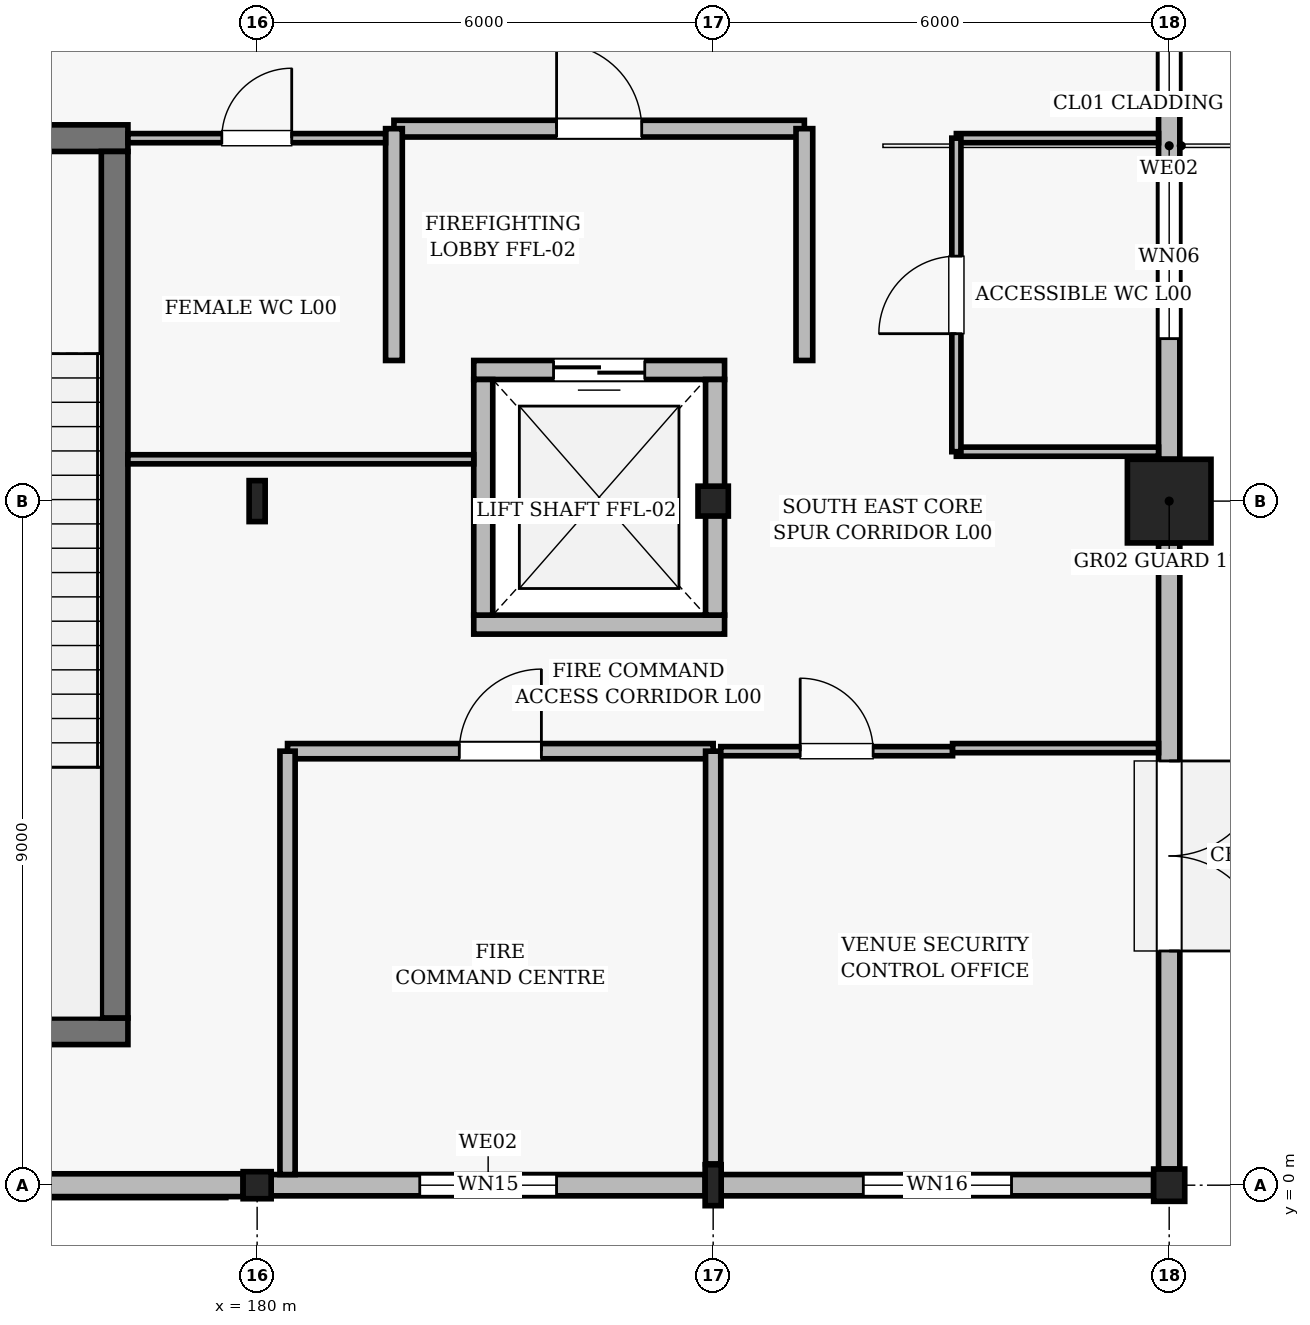
"""IFC4 building model, lengths in metres.
Left out: names, types, materials, properties, quantities, classifications, styles, units other than length and angle.
Written with IfcOpenShell. Run it as: python <this file> out.ifc"""

import sys

from ifc_helpers import new_model, si_unit, direction, frame, frame_2d, origin, origin_2d, place, context, subcontext, project, spatial, rectangle, i_section, extrude, element, fill, save


model = new_model("IFC4")
c1 = context("Model", 3, precision=1e-05, world=origin(), true_north=direction((0.0, 1.0)))
c2 = subcontext(c1, "Body", "Model", "MODEL_VIEW")
j1 = project(units=[si_unit("LENGTHUNIT", "METRE"), si_unit("PLANEANGLEUNIT", "RADIAN")], contexts=[c1])
p1 = place(None, origin())
s1 = spatial("IfcSite", under=j1, at=p1, CompositionType="ELEMENT")
p2 = place(p1, origin())
s2 = spatial("IfcBuilding", under=s1, at=p2, CompositionType="ELEMENT")
p3 = place(p2, origin())
s3 = spatial("IfcBuildingStorey", under=s2, at=p3, CompositionType="ELEMENT", Elevation=0.0)
p4 = place(p3, frame((180.0, 0.0, 0.0), z_axis=(0.0, 0.0, 1.0), x_axis=(1.0, 0.0, 0.0)))
e1 = element("IfcColumn", 1, at=p4, inside=s3, PredefinedType="COLUMN", context=c2, shape_type="SweptSolid", body=[
    extrude(i_section(OverallWidth=0.369, OverallDepth=0.356, WebThickness=0.011, FlangeThickness=0.018, FilletRadius=0.015, at=origin_2d()), origin(), (0.0, 0.0, 1.0), 5.4),
])
for number, where, z_axis, x_axis in (
    (2, (180.0, 9.0, 0.0), (0.0, 0.0, 1.0), (1.0, 0.0, 0.0)),
    (3, (186.0, 0.0, 0.0), (0.0, 0.0, 1.0), (1.0, 0.0, 0.0)),
):
    element("IfcColumn", number, at=place(p3, frame(where, z_axis=z_axis, x_axis=x_axis)), inside=s3, PredefinedType="COLUMN", context=c2, shape_type="SweptSolid", body=[
        extrude(i_section(OverallWidth=0.211, OverallDepth=0.539, WebThickness=0.012, FlangeThickness=0.019, FilletRadius=0.014, at=origin_2d()), origin(), (0.0, 0.0, 1.0), 5.4),
    ])
p5 = place(p3, frame((186.0, 9.0, 0.0), z_axis=(0.0, 0.0, 1.0), x_axis=(1.0, 0.0, 0.0)))
e4 = element("IfcColumn", 4, at=p5, inside=s3, PredefinedType="COLUMN", context=c2, shape_type="SweptSolid", body=[
    extrude(i_section(OverallWidth=0.399, OverallDepth=0.393, WebThickness=0.023, FlangeThickness=0.037, FilletRadius=0.018, at=origin_2d()), origin(), (0.0, 0.0, 1.0), 5.4),
])
p6 = place(p3, frame((192.0, 0.0, 0.0), z_axis=(0.0, 0.0, 1.0), x_axis=(1.0, 0.0, 0.0)))
e5 = element("IfcColumn", 5, at=p6, inside=s3, PredefinedType="COLUMN", context=c2, shape_type="SweptSolid", body=[
    extrude(i_section(OverallWidth=0.409, OverallDepth=0.425, WebThickness=0.031, FlangeThickness=0.049, FilletRadius=0.02, at=origin_2d()), origin(), (0.0, 0.0, 1.0), 5.4),
])
p7 = place(p3, frame((192.0, 9.0, 0.0), z_axis=(0.0, 0.0, 1.0), x_axis=(1.0, 0.0, 0.0)))
e6 = element("IfcColumn", 6, at=p7, inside=s3, PredefinedType="COLUMN", context=c2, shape_type="SweptSolid", body=[
    extrude(rectangle(XDim=1.1, YDim=1.1, at=origin_2d()), origin(), (0.0, 0.0, 1.0), 5.4),
])
p8 = place(p3, frame((192.0, 8.45, 0.0), z_axis=(0.0, 0.0, 1.0), x_axis=(0.0, -1.0, 0.0)))
e7 = element("IfcWall", 7, at=p8, inside=s3, PredefinedType="SOLIDWALL", context=c2, shape_type="SweptSolid", body=[
    extrude(rectangle(XDim=8.238, YDim=0.28, at=frame_2d((4.119, 0.0))), origin(), (0.0, 0.0, 1.0), 4.699),
])
p9 = place(p8, frame((2.869, 0.0, 0.0)))
e8 = element("IfcOpeningElement", 8, at=p9, cuts=e7, PredefinedType="OPENING", context=c2, shape_type="SweptSolid", body=[
    extrude(rectangle(XDim=2.5, YDim=2.45, at=frame_2d((1.25, 1.225))), frame((0.0, 0.15, 0.0), z_axis=(0.0, -1.0, 0.0), x_axis=(1.0, 0.0, 0.0)), (0.0, 0.0, 1.0), 0.3),
])
p10 = place(p3, frame((192.0, 17.8, 0.0), z_axis=(0.0, 0.0, 1.0), x_axis=(0.0, -1.0, 0.0)))
e9 = element("IfcWall", 9, at=p10, inside=s3, PredefinedType="SOLIDWALL", context=c2, shape_type="SweptSolid", body=[
    extrude(rectangle(XDim=8.25, YDim=0.28, at=frame_2d((4.125, 0.0))), origin(), (0.0, 0.0, 1.0), 4.865),
])
p11 = place(p10, frame((1.663, 0.0, 0.95)))
e10 = element("IfcOpeningElement", 10, at=p11, cuts=e9, PredefinedType="OPENING", context=c2, shape_type="SweptSolid", body=[
    extrude(rectangle(XDim=2.0, YDim=1.85, at=frame_2d((1.0, 0.925))), frame((0.0, 0.15, 0.0), z_axis=(0.0, -1.0, 0.0), x_axis=(1.0, 0.0, 0.0)), (0.0, 0.0, 1.0), 0.3),
])
p12 = place(p10, frame((4.512, 0.0, 0.95)))
e11 = element("IfcOpeningElement", 11, at=p12, cuts=e9, PredefinedType="OPENING", context=c2, shape_type="SweptSolid", body=[
    extrude(rectangle(XDim=2.15, YDim=1.85, at=frame_2d((1.075, 0.925))), frame((0.0, 0.15, 0.0), z_axis=(0.0, -1.0, 0.0), x_axis=(1.0, 0.0, 0.0)), (0.0, 0.0, 1.0), 0.3),
])
p13 = place(p3, frame((179.815, 0.0, 0.0), z_axis=(0.0, 0.0, 1.0), x_axis=(-1.0, 0.0, 0.0)))
e12 = element("IfcWall", 12, at=p13, inside=s3, PredefinedType="SOLIDWALL", context=c2, shape_type="SweptSolid", body=[
    extrude(rectangle(XDim=8.628, YDim=0.3, at=frame_2d((4.314, 0.0))), origin(), (0.0, 0.0, 1.0), 4.626),
])
p14 = place(p3, frame((185.895, 0.0, 0.0), z_axis=(0.0, 0.0, 1.0), x_axis=(-1.0, 0.0, 0.0)))
e13 = element("IfcWall", 13, at=p14, inside=s3, PredefinedType="SOLIDWALL", context=c2, shape_type="SweptSolid", body=[
    extrude(rectangle(XDim=5.71, YDim=0.28, at=frame_2d((2.855, 0.0))), origin(), (0.0, 0.0, 1.0), 4.699),
])
p15 = place(p14, frame((1.955, 0.0, 0.95)))
e14 = element("IfcOpeningElement", 14, at=p15, cuts=e13, PredefinedType="OPENING", context=c2, shape_type="SweptSolid", body=[
    extrude(rectangle(XDim=1.8, YDim=2.1, at=frame_2d((0.9, 1.05))), frame((0.0, 0.15, 0.0), z_axis=(0.0, -1.0, 0.0), x_axis=(1.0, 0.0, 0.0)), (0.0, 0.0, 1.0), 0.3),
])
p16 = place(p3, frame((191.795, 0.0, 0.0), z_axis=(0.0, 0.0, 1.0), x_axis=(-1.0, 0.0, 0.0)))
e15 = element("IfcWall", 15, at=p16, inside=s3, PredefinedType="SOLIDWALL", context=c2, shape_type="SweptSolid", body=[
    extrude(rectangle(XDim=5.69, YDim=0.28, at=frame_2d((2.845, 0.0))), origin(), (0.0, 0.0, 1.0), 4.865),
])
p17 = place(p16, frame((1.87, 0.0, 0.95)))
e16 = element("IfcOpeningElement", 16, at=p17, cuts=e15, PredefinedType="OPENING", context=c2, shape_type="SweptSolid", body=[
    extrude(rectangle(XDim=1.95, YDim=2.1, at=frame_2d((0.975, 1.05))), frame((0.0, 0.15, 0.0), z_axis=(0.0, -1.0, 0.0), x_axis=(1.0, 0.0, 0.0)), (0.0, 0.0, 1.0), 0.3),
])
p18 = place(p3, frame((172.1, 2.025, 0.0), z_axis=(0.0, 0.0, 1.0), x_axis=(1.0, 0.0, 0.0)))
e17 = element("IfcWall", 17, at=p18, inside=s3, PredefinedType="SHEAR", context=c2, shape_type="SweptSolid", body=[
    extrude(rectangle(XDim=6.2, YDim=0.35, at=frame_2d((3.1, 0.0))), origin(), (0.0, 0.0, 1.0), 5.18),
])
p19 = place(p3, frame((178.3, 13.775, 0.0), z_axis=(0.0, 0.0, 1.0), x_axis=(-1.0, 0.0, 0.0)))
e18 = element("IfcWall", 18, at=p19, inside=s3, PredefinedType="SHEAR", context=c2, shape_type="SweptSolid", body=[
    extrude(rectangle(XDim=6.2, YDim=0.35, at=frame_2d((3.1, 0.0))), origin(), (0.0, 0.0, 1.0), 5.18),
])
p20 = place(p19, frame((2.2, 0.0, 0.0)))
e19 = element("IfcOpeningElement", 19, at=p20, cuts=e18, PredefinedType="OPENING", context=c2, shape_type="SweptSolid", body=[
    extrude(rectangle(XDim=1.8, YDim=2.2, at=frame_2d((0.9, 1.1))), frame((0.0, 0.185, 0.0), z_axis=(0.0, -1.0, 0.0), x_axis=(1.0, 0.0, 0.0)), (0.0, 0.0, 1.0), 0.37),
])
p21 = place(p3, frame((178.125, 2.2, 0.0), z_axis=(0.0, 0.0, 1.0), x_axis=(0.0, 1.0, 0.0)))
e20 = element("IfcWall", 20, at=p21, inside=s3, PredefinedType="SHEAR", context=c2, shape_type="SweptSolid", body=[
    extrude(rectangle(XDim=11.4, YDim=0.35, at=frame_2d((5.7, 0.0))), origin(), (0.0, 0.0, 1.0), 5.18),
])
p22 = place(p3, frame((182.85, 7.375, 0.0), z_axis=(0.0, 0.0, 1.0), x_axis=(1.0, 0.0, 0.0)))
e21 = element("IfcWall", 21, at=p22, inside=s3, PredefinedType="SOLIDWALL", context=c2, shape_type="SweptSolid", body=[
    extrude(rectangle(XDim=3.3, YDim=0.25, at=frame_2d((1.65, 0.0))), origin(), (0.0, 0.0, 1.0), 5.18),
])
p23 = place(p3, frame((186.15, 10.725, 0.0), z_axis=(0.0, 0.0, 1.0), x_axis=(-1.0, 0.0, 0.0)))
e22 = element("IfcWall", 22, at=p23, inside=s3, PredefinedType="SOLIDWALL", context=c2, shape_type="SweptSolid", body=[
    extrude(rectangle(XDim=3.3, YDim=0.25, at=frame_2d((1.65, 0.0))), origin(), (0.0, 0.0, 1.0), 5.18),
])
p24 = place(p23, frame((1.05, 0.0, 0.0)))
e23 = element("IfcOpeningElement", 23, at=p24, cuts=e22, PredefinedType="OPENING", context=c2, shape_type="SweptSolid", body=[
    extrude(rectangle(XDim=1.2, YDim=2.25, at=frame_2d((0.6, 1.125))), frame((0.0, 0.135, 0.0), z_axis=(0.0, -1.0, 0.0), x_axis=(1.0, 0.0, 0.0)), (0.0, 0.0, 1.0), 0.27),
])
for number, where, z_axis, x_axis in (
    (24, (182.975, 10.6, 0.0), (0.0, 0.0, 1.0), (0.0, -1.0, 0.0)),
    (25, (186.025, 7.5, 0.0), (0.0, 0.0, 1.0), (0.0, 1.0, 0.0)),
):
    element("IfcWall", number, at=place(p3, frame(where, z_axis=z_axis, x_axis=x_axis)), inside=s3, PredefinedType="SOLIDWALL", context=c2, shape_type="SweptSolid", body=[
        extrude(rectangle(XDim=3.1, YDim=0.25, at=frame_2d((1.55, 0.0))), origin(), (0.0, 0.0, 1.0), 5.18),
    ])
p25 = place(p3, frame((181.8, 13.9, 0.0), z_axis=(0.0, 0.0, 1.0), x_axis=(1.0, 0.0, 0.0)))
e26 = element("IfcWall", 26, at=p25, inside=s3, PredefinedType="SOLIDWALL", context=c2, shape_type="SweptSolid", body=[
    extrude(rectangle(XDim=5.4, YDim=0.22, at=frame_2d((2.7, 0.0))), origin(), (0.0, 0.0, 1.0), 5.18),
])
p26 = place(p25, frame((2.14, 0.0, 0.0)))
e27 = element("IfcOpeningElement", 27, at=p26, cuts=e26, PredefinedType="OPENING", context=c2, shape_type="SweptSolid", body=[
    extrude(rectangle(XDim=1.12, YDim=2.2, at=frame_2d((0.56, 1.1))), frame((0.0, 0.12, 0.0), z_axis=(0.0, -1.0, 0.0), x_axis=(1.0, 0.0, 0.0)), (0.0, 0.0, 1.0), 0.24),
])
for number, where, z_axis, x_axis in (
    (28, (181.8, 10.85, 0.0), (0.0, 0.0, 1.0), (0.0, 1.0, 0.0)),
    (29, (187.2, 10.85, 0.0), (0.0, 0.0, 1.0), (0.0, 1.0, 0.0)),
):
    element("IfcWall", number, at=place(p3, frame(where, z_axis=z_axis, x_axis=x_axis)), inside=s3, PredefinedType="SOLIDWALL", context=c2, shape_type="SweptSolid", body=[
        extrude(rectangle(XDim=3.05, YDim=0.22, at=frame_2d((1.525, 0.0))), origin(), (0.0, 0.0, 1.0), 5.18),
    ])
p27 = place(p3, frame((178.3, 13.775, 0.0), z_axis=(0.0, 0.0, 1.0), x_axis=(1.0, 0.0, 0.0)))
e30 = element("IfcWall", 30, at=p27, inside=s3, PredefinedType="PARTITIONING", context=c2, shape_type="SweptSolid", body=[
    extrude(rectangle(XDim=3.39, YDim=0.12, at=frame_2d((1.695, 0.0))), origin(), (0.0, 0.0, 1.0), 4.392),
])
p28 = place(p27, frame((1.235, 0.0, 0.0)))
e31 = element("IfcOpeningElement", 31, at=p28, cuts=e30, PredefinedType="OPENING", context=c2, shape_type="SweptSolid", body=[
    extrude(rectangle(XDim=0.92, YDim=2.12, at=frame_2d((0.46, 1.06))), frame((0.0, 0.07, 0.0), z_axis=(0.0, -1.0, 0.0), x_axis=(1.0, 0.0, 0.0)), (0.0, 0.0, 1.0), 0.14),
])
p29 = place(p3, frame((182.85, 9.55, 0.0), z_axis=(0.0, 0.0, 1.0), x_axis=(-1.0, 0.0, 0.0)))
e32 = element("IfcWall", 32, at=p29, inside=s3, PredefinedType="PARTITIONING", context=c2, shape_type="SweptSolid", body=[
    extrude(rectangle(XDim=4.55, YDim=0.12, at=frame_2d((2.275, 0.0))), origin(), (0.0, 0.0, 1.0), 4.392),
])
for number, where, z_axis, x_axis in (
    (33, (189.2, 13.775, 0.0), (0.0, 0.0, 1.0), (1.0, 0.0, 0.0)),
    (34, (191.86, 9.65, 0.0), (0.0, 0.0, 1.0), (-1.0, 0.0, 0.0)),
):
    element("IfcWall", number, at=place(p3, frame(where, z_axis=z_axis, x_axis=x_axis)), inside=s3, PredefinedType="PARTITIONING", context=c2, shape_type="SweptSolid", body=[
        extrude(rectangle(XDim=2.66, YDim=0.12, at=frame_2d((1.33, 0.0))), origin(), (0.0, 0.0, 1.0), 4.865),
    ])
p30 = place(p3, frame((189.2, 9.65, 0.0), z_axis=(0.0, 0.0, 1.0), x_axis=(0.0, 1.0, 0.0)))
e35 = element("IfcWall", 35, at=p30, inside=s3, PredefinedType="PARTITIONING", context=c2, shape_type="SweptSolid", body=[
    extrude(rectangle(XDim=4.125, YDim=0.12, at=frame_2d((2.062, 0.0))), origin(), (0.0, 0.0, 1.0), 5.18),
])
p31 = place(p30, frame((1.552, 0.0, 0.0)))
e36 = element("IfcOpeningElement", 36, at=p31, cuts=e35, PredefinedType="OPENING", context=c2, shape_type="SweptSolid", body=[
    extrude(rectangle(XDim=1.02, YDim=2.16, at=frame_2d((0.51, 1.08))), frame((0.0, 0.07, 0.0), z_axis=(0.0, -1.0, 0.0), x_axis=(1.0, 0.0, 0.0)), (0.0, 0.0, 1.0), 0.14),
])
p32 = place(p3, frame((180.4, 5.71, 0.0), z_axis=(0.0, 0.0, 1.0), x_axis=(1.0, 0.0, 0.0)))
e37 = element("IfcWall", 37, at=p32, inside=s3, PredefinedType="PARTITIONING", context=c2, shape_type="SweptSolid", body=[
    extrude(rectangle(XDim=5.6, YDim=0.2, at=frame_2d((2.8, 0.0))), origin(), (0.0, 0.0, 1.0), 4.481),
])
p33 = place(p32, frame((2.26, 0.0, 0.0)))
e38 = element("IfcOpeningElement", 38, at=p33, cuts=e37, PredefinedType="OPENING", context=c2, shape_type="SweptSolid", body=[
    extrude(rectangle(XDim=1.08, YDim=2.22, at=frame_2d((0.54, 1.11))), frame((0.0, 0.11, 0.0), z_axis=(0.0, -1.0, 0.0), x_axis=(1.0, 0.0, 0.0)), (0.0, 0.0, 1.0), 0.22),
])
p34 = place(p3, frame((186.0, 5.71, 0.0), z_axis=(0.0, 0.0, 1.0), x_axis=(0.0, -1.0, 0.0)))
e39 = element("IfcWall", 39, at=p34, inside=s3, PredefinedType="PARTITIONING", context=c2, shape_type="SweptSolid", body=[
    extrude(rectangle(XDim=5.43, YDim=0.2, at=frame_2d((2.715, 0.0))), origin(), (0.0, 0.0, 1.0), 4.699),
])
p35 = place(p3, frame((180.4, 0.14, 0.0), z_axis=(0.0, 0.0, 1.0), x_axis=(0.0, 1.0, 0.0)))
e40 = element("IfcWall", 40, at=p35, inside=s3, PredefinedType="PARTITIONING", context=c2, shape_type="SweptSolid", body=[
    extrude(rectangle(XDim=5.57, YDim=0.2, at=frame_2d((2.785, 0.0))), origin(), (0.0, 0.0, 1.0), 4.481),
])
p36 = place(p3, frame((186.1, 5.71, 0.0), z_axis=(0.0, 0.0, 1.0), x_axis=(1.0, 0.0, 0.0)))
e41 = element("IfcWall", 41, at=p36, inside=s3, PredefinedType="PARTITIONING", context=c2, shape_type="SweptSolid", body=[
    extrude(rectangle(XDim=3.05, YDim=0.12, at=frame_2d((1.525, 0.0))), origin(), (0.0, 0.0, 1.0), 5.18),
])
p37 = place(p36, frame((1.045, 0.0, 0.0)))
e42 = element("IfcOpeningElement", 42, at=p37, cuts=e41, PredefinedType="OPENING", context=c2, shape_type="SweptSolid", body=[
    extrude(rectangle(XDim=0.96, YDim=2.15, at=frame_2d((0.48, 1.075))), frame((0.0, 0.07, 0.0), z_axis=(0.0, -1.0, 0.0), x_axis=(1.0, 0.0, 0.0)), (0.0, 0.0, 1.0), 0.14),
])
p38 = place(p3, frame((189.15, 5.75, 0.0), z_axis=(0.0, 0.0, 1.0), x_axis=(1.0, 0.0, 0.0)))
e43 = element("IfcWall", 43, at=p38, inside=s3, PredefinedType="PARTITIONING", context=c2, shape_type="SweptSolid", body=[
    extrude(rectangle(XDim=2.71, YDim=0.12, at=frame_2d((1.355, 0.0))), origin(), (0.0, 0.0, 1.0), 4.699),
])
p39 = place(p9, origin())
e44 = element("IfcDoor", 44, at=p39, inside=s3, OperationType="DOUBLE_DOOR_SINGLE_SWING", PredefinedType="DOOR", context=c2, shape_type="SweptSolid", body=[
    extrude(rectangle(XDim=2.5, YDim=2.45, at=frame_2d((1.25, 1.225))), frame((0.0, 0.025, 0.0), z_axis=(0.0, -1.0, 0.0), x_axis=(1.0, 0.0, 0.0)), (0.0, 0.0, 1.0), 0.05),
])
fill(e8, e44)
p40 = place(p11, origin())
e45 = element("IfcWindow", 45, at=p40, inside=s3, PartitioningType="SINGLE_PANEL", PredefinedType="WINDOW", context=c2, shape_type="SweptSolid", body=[
    extrude(rectangle(XDim=2.0, YDim=1.85, at=frame_2d((1.0, 0.925))), frame((0.0, 0.03, 0.0), z_axis=(0.0, -1.0, 0.0), x_axis=(1.0, 0.0, 0.0)), (0.0, 0.0, 1.0), 0.06),
])
fill(e10, e45)
p41 = place(p12, origin())
e46 = element("IfcWindow", 46, at=p41, inside=s3, PartitioningType="SINGLE_PANEL", PredefinedType="WINDOW", context=c2, shape_type="SweptSolid", body=[
    extrude(rectangle(XDim=2.15, YDim=1.85, at=frame_2d((1.075, 0.925))), frame((0.0, 0.03, 0.0), z_axis=(0.0, -1.0, 0.0), x_axis=(1.0, 0.0, 0.0)), (0.0, 0.0, 1.0), 0.06),
])
fill(e11, e46)
p42 = place(p15, origin())
e47 = element("IfcWindow", 47, at=p42, inside=s3, PartitioningType="SINGLE_PANEL", PredefinedType="WINDOW", context=c2, shape_type="SweptSolid", body=[
    extrude(rectangle(XDim=1.8, YDim=2.1, at=frame_2d((0.9, 1.05))), frame((0.0, 0.03, 0.0), z_axis=(0.0, -1.0, 0.0), x_axis=(1.0, 0.0, 0.0)), (0.0, 0.0, 1.0), 0.06),
])
fill(e14, e47)
p43 = place(p17, origin())
e48 = element("IfcWindow", 48, at=p43, inside=s3, PartitioningType="SINGLE_PANEL", PredefinedType="WINDOW", context=c2, shape_type="SweptSolid", body=[
    extrude(rectangle(XDim=1.95, YDim=2.1, at=frame_2d((0.975, 1.05))), frame((0.0, 0.03, 0.0), z_axis=(0.0, -1.0, 0.0), x_axis=(1.0, 0.0, 0.0)), (0.0, 0.0, 1.0), 0.06),
])
fill(e16, e48)
p44 = place(p24, origin())
e49 = element("IfcDoor", 49, at=p44, inside=s3, OperationType="DOUBLE_DOOR_SLIDING", PredefinedType="DOOR", context=c2, shape_type="SweptSolid", body=[
    extrude(rectangle(XDim=1.2, YDim=2.25, at=frame_2d((0.6, 1.125))), frame((0.0, 0.025, 0.0), z_axis=(0.0, -1.0, 0.0), x_axis=(1.0, 0.0, 0.0)), (0.0, 0.0, 1.0), 0.05),
])
fill(e23, e49)
p45 = place(p26, origin())
e50 = element("IfcDoor", 50, at=p45, inside=s3, OperationType="SINGLE_SWING_LEFT", PredefinedType="DOOR", context=c2, shape_type="SweptSolid", body=[
    extrude(rectangle(XDim=1.12, YDim=2.2, at=frame_2d((0.56, 1.1))), frame((0.0, 0.025, 0.0), z_axis=(0.0, -1.0, 0.0), x_axis=(1.0, 0.0, 0.0)), (0.0, 0.0, 1.0), 0.05),
])
fill(e27, e50)
p46 = place(p28, origin())
e51 = element("IfcDoor", 51, at=p46, inside=s3, OperationType="SINGLE_SWING_RIGHT", PredefinedType="DOOR", context=c2, shape_type="SweptSolid", body=[
    extrude(rectangle(XDim=0.92, YDim=2.12, at=frame_2d((0.46, 1.06))), frame((0.0, 0.025, 0.0), z_axis=(0.0, -1.0, 0.0), x_axis=(1.0, 0.0, 0.0)), (0.0, 0.0, 1.0), 0.05),
])
fill(e31, e51)
p47 = place(p31, origin())
e52 = element("IfcDoor", 52, at=p47, inside=s3, OperationType="SINGLE_SWING_LEFT", PredefinedType="DOOR", context=c2, shape_type="SweptSolid", body=[
    extrude(rectangle(XDim=1.02, YDim=2.16, at=frame_2d((0.51, 1.08))), frame((0.0, 0.025, 0.0), z_axis=(0.0, -1.0, 0.0), x_axis=(1.0, 0.0, 0.0)), (0.0, 0.0, 1.0), 0.05),
])
fill(e36, e52)
p48 = place(p33, origin())
e53 = element("IfcDoor", 53, at=p48, inside=s3, OperationType="SINGLE_SWING_RIGHT", PredefinedType="DOOR", context=c2, shape_type="SweptSolid", body=[
    extrude(rectangle(XDim=1.08, YDim=2.22, at=frame_2d((0.54, 1.11))), frame((0.0, 0.025, 0.0), z_axis=(0.0, -1.0, 0.0), x_axis=(1.0, 0.0, 0.0)), (0.0, 0.0, 1.0), 0.05),
])
fill(e38, e53)
p49 = place(p37, origin())
e54 = element("IfcDoor", 54, at=p49, inside=s3, OperationType="SINGLE_SWING_LEFT", PredefinedType="DOOR", context=c2, shape_type="SweptSolid", body=[
    extrude(rectangle(XDim=0.96, YDim=2.15, at=frame_2d((0.48, 1.075))), frame((0.0, 0.025, 0.0), z_axis=(0.0, -1.0, 0.0), x_axis=(1.0, 0.0, 0.0)), (0.0, 0.0, 1.0), 0.05),
])
fill(e42, e54)
save(model, sys.argv[1])
